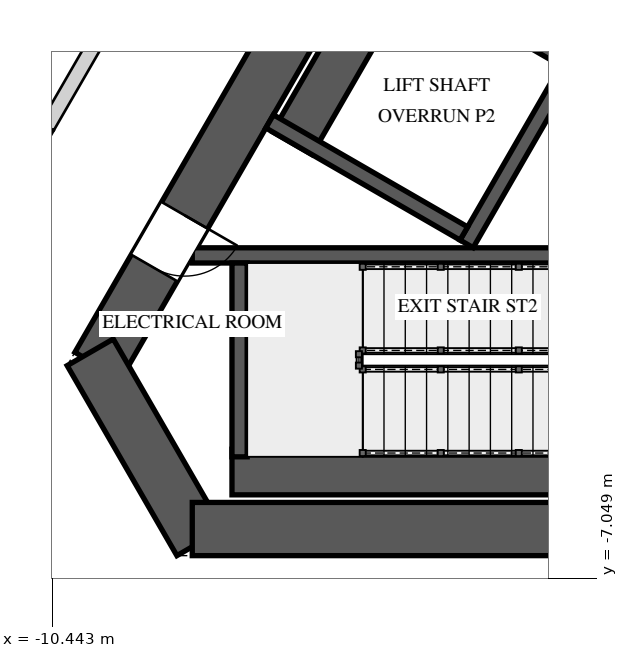
"""IFC4 building model, lengths in metres.
Left out: names, types, materials, properties, quantities, classifications, styles, units other than length and angle.
Written with IfcOpenShell. Run it as: python <this file> out.ifc"""

import sys

from ifc_helpers import new_model, si_unit, direction, frame, frame_2d, origin, place, context, subcontext, project, spatial, rectangle, extrude, element, fill, save


model = new_model("IFC4")
c1 = context("Model", 3, precision=1e-05, world=origin(), true_north=direction((0.0, 1.0)))
c2 = subcontext(c1, "Body", "Model", "MODEL_VIEW")
j1 = project(units=[si_unit("LENGTHUNIT", "METRE"), si_unit("PLANEANGLEUNIT", "RADIAN")], contexts=[c1])
p1 = place(None, origin())
s1 = spatial("IfcSite", under=j1, at=p1, CompositionType="ELEMENT")
p2 = place(p1, origin())
s2 = spatial("IfcBuilding", under=s1, at=p2, CompositionType="ELEMENT")
p3 = place(p2, frame((0.0, 0.0, 241.2)))
s3 = spatial("IfcBuildingStorey", under=s2, at=p3, CompositionType="ELEMENT", Elevation=241.2)
p4 = place(p3, frame((-1.241, 10.65, 0.0), z_axis=(0.0, 0.0, 1.0), x_axis=(-0.500003331888, -0.866023480109, 0.0)))
e1 = element("IfcWall", 1, at=p4, inside=s3, PredefinedType="SHEAR", context=c2, shape_type="SweptSolid", body=[
    extrude(rectangle(XDim=17.205, YDim=0.7, at=frame_2d((8.603, 0.0))), origin(), (0.0, 0.0, 1.0), 4.0),
])
p5 = place(p4, frame((6.808, 0.0, 0.0)))
e2 = element("IfcOpeningElement", 2, at=p5, cuts=e1, PredefinedType="OPENING", context=c2, shape_type="SweptSolid", body=[
    extrude(rectangle(XDim=1.0, YDim=2.4, at=frame_2d((0.5, 1.2))), frame((0.0, 0.36, 0.0), z_axis=(0.0, -1.0, 0.0), x_axis=(1.0, 0.0, 0.0)), (0.0, 0.0, 1.0), 0.72),
])
p6 = place(p4, frame((14.922, 0.0, 0.0)))
e3 = element("IfcOpeningElement", 3, at=p6, cuts=e1, PredefinedType="OPENING", context=c2, shape_type="SweptSolid", body=[
    extrude(rectangle(XDim=0.8, YDim=2.1, at=frame_2d((0.4, 1.05))), frame((0.0, 0.36, 0.0), z_axis=(0.0, -1.0, 0.0), x_axis=(1.0, 0.0, 0.0)), (0.0, 0.0, 1.0), 0.72),
])
p7 = place(p3, frame((-9.945, -4.075, 0.0), z_axis=(0.0, 0.0, 1.0), x_axis=(0.499995765644, -0.866027848477, 0.0)))
e4 = element("IfcWall", 4, at=p7, inside=s3, PredefinedType="SHEAR", context=c2, shape_type="SweptSolid", body=[
    extrude(rectangle(XDim=2.887, YDim=0.7, at=frame_2d((1.443, 0.0))), origin(), (0.0, 0.0, 1.0), 4.0),
])
p8 = place(p3, frame((-8.603, -6.4, 0.0), z_axis=(0.0, 0.0, 1.0), x_axis=(1.0, 0.0, 0.0)))
e5 = element("IfcWall", 5, at=p8, inside=s3, PredefinedType="SHEAR", context=c2, shape_type="SweptSolid", body=[
    extrude(rectangle(XDim=17.205, YDim=0.7, at=frame_2d((8.603, 0.0))), origin(), (0.0, 0.0, 1.0), 4.0),
])
p9 = place(p8, frame((6.808, 0.0, 0.0)))
e6 = element("IfcOpeningElement", 6, at=p9, cuts=e5, PredefinedType="OPENING", context=c2, shape_type="SweptSolid", body=[
    extrude(rectangle(XDim=1.0, YDim=2.4, at=frame_2d((0.5, 1.2))), frame((0.0, 0.36, 0.0), z_axis=(0.0, -1.0, 0.0), x_axis=(1.0, 0.0, 0.0)), (0.0, 0.0, 1.0), 0.72),
])
p10 = place(p8, frame((14.922, 0.0, 0.0)))
e7 = element("IfcOpeningElement", 7, at=p10, cuts=e5, PredefinedType="OPENING", context=c2, shape_type="SweptSolid", body=[
    extrude(rectangle(XDim=0.8, YDim=2.1, at=frame_2d((0.4, 1.05))), frame((0.0, 0.36, 0.0), z_axis=(0.0, -1.0, 0.0), x_axis=(1.0, 0.0, 0.0)), (0.0, 0.0, 1.0), 0.72),
])
p11 = place(p3, frame((-8.08, -5.65, 0.0), z_axis=(0.0, 0.0, 1.0), x_axis=(1.0, 0.0, 0.0)))
e8 = element("IfcWall", 8, at=p11, inside=s3, PredefinedType="SOLIDWALL", context=c2, shape_type="SweptSolid", body=[
    extrude(rectangle(XDim=6.2, YDim=0.6, at=frame_2d((3.1, 0.0))), origin(), (0.0, 0.0, 1.0), 3.65),
])
p12 = place(p3, frame((-8.603, -2.8, 0.0), z_axis=(0.0, 0.0, 1.0), x_axis=(1.0, 0.0, 0.0)))
e9 = element("IfcWall", 9, at=p12, inside=s3, PredefinedType="SOLIDWALL", context=c2, shape_type="SweptSolid", body=[
    extrude(rectangle(XDim=6.723, YDim=0.2, at=frame_2d((3.361, 0.0))), origin(), (0.0, 0.0, 1.0), 3.65),
])
p13 = place(p3, frame((-7.98, -2.9, 0.0), z_axis=(0.0, 0.0, 1.0), x_axis=(0.0, -1.0, 0.0)))
e10 = element("IfcWall", 10, at=p13, inside=s3, PredefinedType="SOLIDWALL", context=c2, shape_type="SweptSolid", body=[
    extrude(rectangle(XDim=2.55, YDim=0.2, at=frame_2d((1.275, 0.0))), origin(), (0.0, 0.0, 1.0), 3.65),
])
p14 = place(p3, frame((-2.243, 2.115, 0.0), z_axis=(0.0, 0.0, 1.0), x_axis=(-0.499996545922, -0.866027397988, 0.0)))
e11 = element("IfcWall", 11, at=p14, inside=s3, PredefinedType="SOLIDWALL", context=c2, shape_type="SweptSolid", body=[
    extrude(rectangle(XDim=5.5, YDim=0.2, at=frame_2d((2.75, 0.0))), origin(), (0.0, 0.0, 1.0), 3.65),
])
p15 = place(p3, frame((-4.538, 3.44, 0.0), z_axis=(0.0, 0.0, 1.0), x_axis=(-0.499996545922, -0.866027397988, 0.0)))
e12 = element("IfcWall", 12, at=p15, inside=s3, PredefinedType="SOLIDWALL", context=c2, shape_type="SweptSolid", body=[
    extrude(rectangle(XDim=5.5, YDim=0.6, at=frame_2d((2.75, 0.0))), origin(), (0.0, 0.0, 1.0), 3.65),
])
p16 = place(p3, frame((-3.705, -0.217, 0.0), z_axis=(0.0, 0.0, 1.0), x_axis=(-0.866016039709, 0.500016218704, 0.0)))
e13 = element("IfcWall", 13, at=p16, inside=s3, PredefinedType="SOLIDWALL", context=c2, shape_type="SweptSolid", body=[
    extrude(rectangle(XDim=2.35, YDim=0.2, at=frame_2d((1.175, 0.0))), origin(), (0.0, 0.0, 1.0), 3.65),
])
p17 = place(p3, frame((-5.03, -2.512, 0.0), z_axis=(0.0, 0.0, 1.0), x_axis=(-0.866003658127, 0.500037662692, 0.0)))
e14 = element("IfcWall", 14, at=p17, inside=s3, PredefinedType="SOLIDWALL", context=c2, shape_type="SweptSolid", body=[
    extrude(rectangle(XDim=2.95, YDim=0.2, at=frame_2d((1.475, 0.0))), origin(), (0.0, 0.0, 1.0), 3.65),
])
p18 = place(p3, frame((-12.213, -1.354, 0.0), z_axis=(0.0, 0.0, 1.0), x_axis=(0.500001111708, 0.866024761939, 0.0)))
e15 = element("IfcWall", 15, at=p18, inside=s3, PredefinedType="PARTITIONING", context=c2, shape_type="SweptSolid", body=[
    extrude(rectangle(XDim=4.576, YDim=0.15, at=frame_2d((2.288, 0.0))), origin(), (0.0, 0.0, 1.0), 3.65),
])
p19 = place(p18, frame((0.445, 0.0, 0.0)))
e16 = element("IfcOpeningElement", 16, at=p19, cuts=e15, PredefinedType="OPENING", context=c2, shape_type="SweptSolid", body=[
    extrude(rectangle(XDim=0.95, YDim=2.4, at=frame_2d((0.475, 1.2))), frame((0.0, 0.085, 0.0), z_axis=(0.0, -1.0, 0.0), x_axis=(1.0, 0.0, 0.0)), (0.0, 0.0, 1.0), 0.17),
])
p20 = place(p3, frame((-10.123, -8.067, 0.0), z_axis=(0.0, 0.0, 1.0), x_axis=(-0.500005339912, 0.866022320763, 0.0)))
e17 = element("IfcWall", 17, at=p20, inside=s3, PredefinedType="SOLIDWALL", context=c2, shape_type="SweptSolid", body=[
    extrude(rectangle(XDim=4.408, YDim=0.2, at=frame_2d((2.204, 0.0))), origin(), (0.0, 0.0, 1.0), 3.65),
])
p21 = place(p3, frame((-10.954, -1.873, 0.0), z_axis=(0.0, 0.0, 1.0), x_axis=(0.500016243463, 0.866016025414, 0.0)))
e18 = element("IfcWall", 18, at=p21, inside=s3, PredefinedType="SOLIDWALL", context=c2, shape_type="SweptSolid", body=[
    extrude(rectangle(XDim=0.887, YDim=0.2, at=frame_2d((0.444, 0.0))), origin(), (0.0, 0.0, 1.0), 2.95),
])
p22 = place(p3, frame((-10.51, -1.105, 0.0), z_axis=(0.0, 0.0, 1.0), x_axis=(0.499997905474, 0.866026613056, 0.0)))
e19 = element("IfcWall", 19, at=p22, inside=s3, PredefinedType="SOLIDWALL", context=c2, shape_type="SweptSolid", body=[
    extrude(rectangle(XDim=3.811, YDim=0.2, at=frame_2d((1.905, 0.0))), origin(), (0.0, 0.0, 1.0), 3.65),
])
p23 = place(p6, origin())
e20 = element("IfcDoor", 20, at=p23, inside=s3, OperationType="SINGLE_SWING_LEFT", PredefinedType="DOOR", context=c2, shape_type="SweptSolid", body=[
    extrude(rectangle(XDim=0.8, YDim=2.1, at=frame_2d((0.4, 1.05))), frame((0.0, 0.025, 0.0), z_axis=(0.0, -1.0, 0.0), x_axis=(1.0, 0.0, 0.0)), (0.0, 0.0, 1.0), 0.05),
])
fill(e3, e20)
save(model, sys.argv[1])
